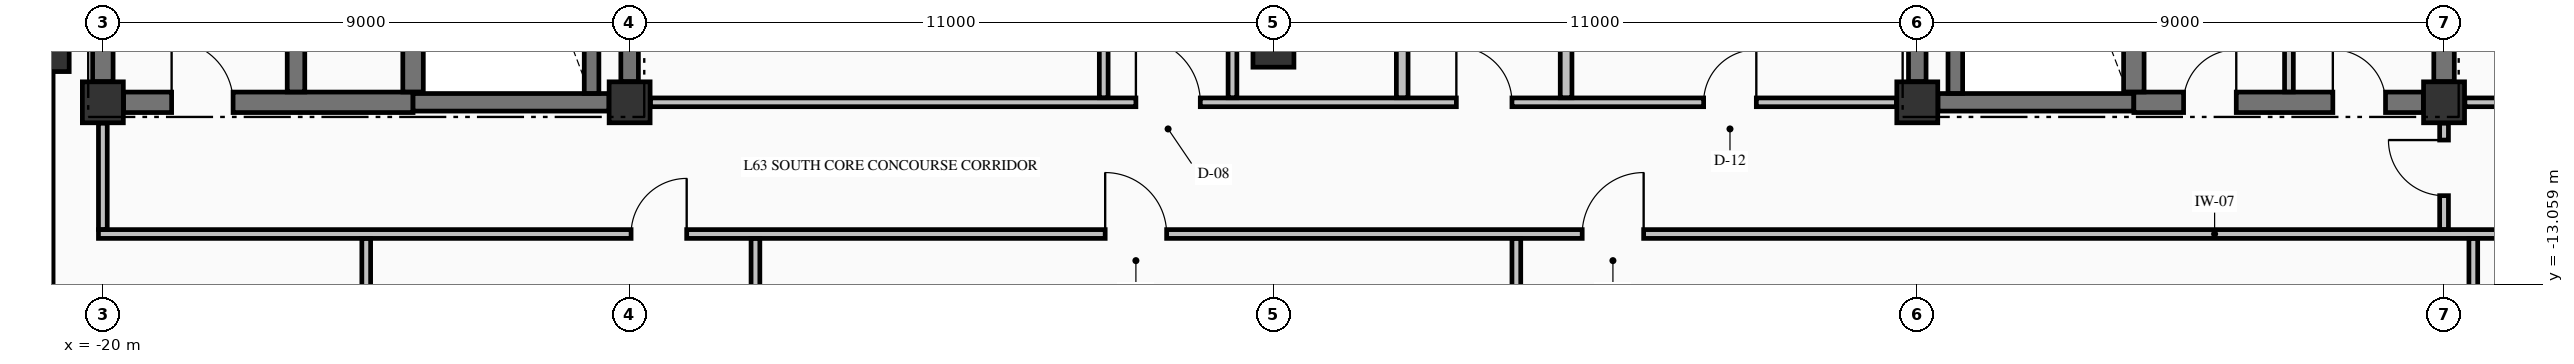
"""IFC4 building model, lengths in metres.
Left out: names, types, materials, properties, quantities, classifications, styles, units other than length and angle.
Written with IfcOpenShell. Run it as: python <this file> out.ifc"""

import sys

from ifc_helpers import new_model, si_unit, direction, frame, frame_2d, origin, origin_2d, place, context, subcontext, project, spatial, rectangle, extrude, element, fill, save


model = new_model("IFC4")
c1 = context("Model", 3, precision=1e-05, world=origin(), true_north=direction((0.0, 1.0)))
c2 = subcontext(c1, "Body", "Model", "MODEL_VIEW")
j1 = project(units=[si_unit("LENGTHUNIT", "METRE"), si_unit("PLANEANGLEUNIT", "RADIAN")], contexts=[c1])
p1 = place(None, origin())
s1 = spatial("IfcSite", under=j1, at=p1, CompositionType="ELEMENT")
p2 = place(p1, origin())
s2 = spatial("IfcBuilding", under=s1, at=p2, CompositionType="ELEMENT")
p3 = place(p2, frame((0.0, 0.0, 239.74)))
s3 = spatial("IfcBuildingStorey", under=s2, at=p3, CompositionType="ELEMENT", Elevation=239.74)
p4 = place(p3, frame((-21.0, -9.0, -0.25), z_axis=(0.0, 0.0, 1.0), x_axis=(1.0, 0.0, 0.0)))
e1 = element("IfcColumn", 1, at=p4, inside=s3, PredefinedType="COLUMN", context=c2, shape_type="SweptSolid", body=[
    extrude(rectangle(XDim=0.85, YDim=0.85, at=origin_2d()), origin(), (0.0, 0.0, 1.0), 3.23),
])
for number, where, z_axis, x_axis in (
    (2, (-20.0, -9.95, -0.25), (0.0, 0.0, 1.0), (1.0, 0.0, 0.0)),
    (3, (-11.0, -9.95, -0.25), (0.0, 0.0, 1.0), (1.0, 0.0, 0.0)),
    (4, (11.0, -9.95, -0.25), (0.0, 0.0, 1.0), (1.0, 0.0, 0.0)),
    (5, (20.0, -9.95, -0.25), (0.0, 0.0, 1.0), (1.0, 0.0, 0.0)),
    (6, (0.0, -9.0, -0.25), (0.0, 0.0, 1.0), (1.0, 0.0, 0.0)),
):
    element("IfcColumn", number, at=place(p3, frame(where, z_axis=z_axis, x_axis=x_axis)), inside=s3, PredefinedType="COLUMN", context=c2, shape_type="SweptSolid", body=[
        extrude(rectangle(XDim=0.7, YDim=0.7, at=origin_2d()), origin(), (0.0, 0.0, 1.0), 3.23),
    ])
p5 = place(p3, frame((-21.0, -9.455, 0.0), z_axis=(0.0, 0.0, 1.0), x_axis=(0.0, -1.0, 0.0)))
e7 = element("IfcWall", 7, at=p5, inside=s3, PredefinedType="STANDARD", context=c2, shape_type="SweptSolid", body=[
    extrude(rectangle(XDim=8.09, YDim=0.3, at=frame_2d((4.045, 0.0))), origin(), (0.0, 0.0, 1.0), 2.372),
])
p6 = place(p3, frame((-19.646, -9.95, 0.0), z_axis=(0.0, 0.0, 1.0), x_axis=(1.0, 0.0, 0.0)))
e8 = element("IfcWall", 8, at=p6, inside=s3, PredefinedType="SHEAR", context=c2, shape_type="SweptSolid", body=[
    extrude(rectangle(XDim=4.946, YDim=0.35, at=frame_2d((2.473, 0.0))), origin(), (0.0, 0.0, 1.0), 2.98),
])
p7 = place(p6, frame((0.821, 0.0, 0.0)))
e9 = element("IfcOpeningElement", 9, at=p7, cuts=e8, PredefinedType="OPENING", context=c2, shape_type="SweptSolid", body=[
    extrude(rectangle(XDim=1.05, YDim=2.15, at=frame_2d((0.525, 1.075))), frame((0.0, 0.185, 0.0), z_axis=(0.0, -1.0, 0.0), x_axis=(1.0, 0.0, 0.0)), (0.0, 0.0, 1.0), 0.37),
])
for number, where, z_axis, x_axis in (
    (10, (-14.7, -9.95, 0.0), (0.0, 0.0, 1.0), (1.0, 0.0, 0.0)),
    (11, (11.354, -9.95, 0.0), (0.0, 0.0, 1.0), (1.0, 0.0, 0.0)),
):
    element("IfcWall", number, at=place(p3, frame(where, z_axis=z_axis, x_axis=x_axis)), inside=s3, PredefinedType="SHEAR", context=c2, shape_type="SweptSolid", body=[
        extrude(rectangle(XDim=3.346, YDim=0.3, at=frame_2d((1.673, 0.0))), origin(), (0.0, 0.0, 1.0), 2.98),
    ])
p8 = place(p3, frame((14.7, -9.95, 0.0), z_axis=(0.0, 0.0, 1.0), x_axis=(1.0, 0.0, 0.0)))
e12 = element("IfcWall", 12, at=p8, inside=s3, PredefinedType="SHEAR", context=c2, shape_type="SweptSolid", body=[
    extrude(rectangle(XDim=4.946, YDim=0.35, at=frame_2d((2.473, 0.0))), origin(), (0.0, 0.0, 1.0), 2.98),
])
p9 = place(p8, frame((0.85, 0.0, 0.0)))
e13 = element("IfcOpeningElement", 13, at=p9, cuts=e12, PredefinedType="OPENING", context=c2, shape_type="SweptSolid", body=[
    extrude(rectangle(XDim=0.9, YDim=2.15, at=frame_2d((0.45, 1.075))), frame((0.0, 0.185, 0.0), z_axis=(0.0, -1.0, 0.0), x_axis=(1.0, 0.0, 0.0)), (0.0, 0.0, 1.0), 0.37),
])
p10 = place(p8, frame((3.4, 0.0, 0.0)))
e14 = element("IfcOpeningElement", 14, at=p10, cuts=e12, PredefinedType="OPENING", context=c2, shape_type="SweptSolid", body=[
    extrude(rectangle(XDim=0.9, YDim=2.15, at=frame_2d((0.45, 1.075))), frame((0.0, 0.185, 0.0), z_axis=(0.0, -1.0, 0.0), x_axis=(1.0, 0.0, 0.0)), (0.0, 0.0, 1.0), 0.37),
])
p11 = place(p3, frame((-20.075, -12.2, 0.0), z_axis=(0.0, 0.0, 1.0), x_axis=(1.0, 0.0, 0.0)))
e15 = element("IfcWall", 15, at=p11, inside=s3, PredefinedType="PARTITIONING", context=c2, shape_type="SweptSolid", body=[
    extrude(rectangle(XDim=45.91, YDim=0.15, at=frame_2d((22.955, 0.0))), origin(), (0.0, 0.0, 1.0), 2.98),
])
p12 = place(p11, frame((9.1, 0.0, 0.0)))
e16 = element("IfcOpeningElement", 16, at=p12, cuts=e15, PredefinedType="OPENING", context=c2, shape_type="SweptSolid", body=[
    extrude(rectangle(XDim=0.95, YDim=2.15, at=frame_2d((0.475, 1.075))), frame((0.0, 0.085, 0.0), z_axis=(0.0, -1.0, 0.0), x_axis=(1.0, 0.0, 0.0)), (0.0, 0.0, 1.0), 0.17),
])
p13 = place(p11, frame((17.2, 0.0, 0.0)))
e17 = element("IfcOpeningElement", 17, at=p13, cuts=e15, PredefinedType="OPENING", context=c2, shape_type="SweptSolid", body=[
    extrude(rectangle(XDim=1.05, YDim=2.15, at=frame_2d((0.525, 1.075))), frame((0.0, 0.085, 0.0), z_axis=(0.0, -1.0, 0.0), x_axis=(1.0, 0.0, 0.0)), (0.0, 0.0, 1.0), 0.17),
])
p14 = place(p11, frame((25.35, 0.0, 0.0)))
e18 = element("IfcOpeningElement", 18, at=p14, cuts=e15, PredefinedType="OPENING", context=c2, shape_type="SweptSolid", body=[
    extrude(rectangle(XDim=1.05, YDim=2.15, at=frame_2d((0.525, 1.075))), frame((0.0, 0.085, 0.0), z_axis=(0.0, -1.0, 0.0), x_axis=(1.0, 0.0, 0.0)), (0.0, 0.0, 1.0), 0.17),
])
p15 = place(p3, frame((-10.644, -9.95, 0.0), z_axis=(0.0, 0.0, 1.0), x_axis=(1.0, 0.0, 0.0)))
e19 = element("IfcWall", 19, at=p15, inside=s3, PredefinedType="PARTITIONING", context=c2, shape_type="SweptSolid", body=[
    extrude(rectangle(XDim=21.288, YDim=0.15, at=frame_2d((10.644, 0.0))), origin(), (0.0, 0.0, 1.0), 2.98),
])
p16 = place(p15, frame((8.294, 0.0, 0.0)))
e20 = element("IfcOpeningElement", 20, at=p16, cuts=e19, PredefinedType="OPENING", context=c2, shape_type="SweptSolid", body=[
    extrude(rectangle(XDim=1.1, YDim=2.15, at=frame_2d((0.55, 1.075))), frame((0.0, 0.085, 0.0), z_axis=(0.0, -1.0, 0.0), x_axis=(1.0, 0.0, 0.0)), (0.0, 0.0, 1.0), 0.17),
])
p17 = place(p15, frame((13.769, 0.0, 0.0)))
e21 = element("IfcOpeningElement", 21, at=p17, cuts=e19, PredefinedType="OPENING", context=c2, shape_type="SweptSolid", body=[
    extrude(rectangle(XDim=0.95, YDim=2.15, at=frame_2d((0.475, 1.075))), frame((0.0, 0.085, 0.0), z_axis=(0.0, -1.0, 0.0), x_axis=(1.0, 0.0, 0.0)), (0.0, 0.0, 1.0), 0.17),
])
p18 = place(p15, frame((17.994, 0.0, 0.0)))
e22 = element("IfcOpeningElement", 22, at=p18, cuts=e19, PredefinedType="OPENING", context=c2, shape_type="SweptSolid", body=[
    extrude(rectangle(XDim=0.9, YDim=2.15, at=frame_2d((0.45, 1.075))), frame((0.0, 0.085, 0.0), z_axis=(0.0, -1.0, 0.0), x_axis=(1.0, 0.0, 0.0)), (0.0, 0.0, 1.0), 0.17),
])
p19 = place(p3, frame((20.356, -9.95, 0.0), z_axis=(0.0, 0.0, 1.0), x_axis=(1.0, 0.0, 0.0)))
e23 = element("IfcWall", 23, at=p19, inside=s3, PredefinedType="PARTITIONING", context=c2, shape_type="SweptSolid", body=[
    extrude(rectangle(XDim=5.479, YDim=0.15, at=frame_2d((2.74, 0.0))), origin(), (0.0, 0.0, 1.0), 2.98),
])
p20 = place(p19, frame((2.169, 0.0, 0.0)))
e24 = element("IfcOpeningElement", 24, at=p20, cuts=e23, PredefinedType="OPENING", context=c2, shape_type="SweptSolid", body=[
    extrude(rectangle(XDim=0.95, YDim=2.15, at=frame_2d((0.475, 1.075))), frame((0.0, 0.085, 0.0), z_axis=(0.0, -1.0, 0.0), x_axis=(1.0, 0.0, 0.0)), (0.0, 0.0, 1.0), 0.17),
])
p21 = place(p3, frame((-20.0, -9.596, 0.0), z_axis=(0.0, 0.0, 1.0), x_axis=(0.0, 1.0, 0.0)))
e25 = element("IfcWall", 25, at=p21, inside=s3, PredefinedType="SHEAR", context=c2, shape_type="SweptSolid", body=[
    extrude(rectangle(XDim=9.194, YDim=0.35, at=frame_2d((4.597, 0.0))), origin(), (0.0, 0.0, 1.0), 2.98),
])
p22 = place(p3, frame((-16.7, -9.773, 0.0), z_axis=(0.0, 0.0, 1.0), x_axis=(0.0, 1.0, 0.0)))
e26 = element("IfcWall", 26, at=p22, inside=s3, PredefinedType="SHEAR", context=c2, shape_type="SweptSolid", body=[
    extrude(rectangle(XDim=9.371, YDim=0.3, at=frame_2d((4.686, 0.0))), origin(), (0.0, 0.0, 1.0), 2.98),
])
p23 = place(p3, frame((-14.7, -9.773, 0.0), z_axis=(0.0, 0.0, 1.0), x_axis=(0.0, 1.0, 0.0)))
e27 = element("IfcWall", 27, at=p23, inside=s3, PredefinedType="SHEAR", context=c2, shape_type="SweptSolid", body=[
    extrude(rectangle(XDim=9.371, YDim=0.35, at=frame_2d((4.686, 0.0))), origin(), (0.0, 0.0, 1.0), 2.98),
])
p24 = place(p3, frame((-11.65, -9.798, 0.0), z_axis=(0.0, 0.0, 1.0), x_axis=(0.0, 1.0, 0.0)))
e28 = element("IfcWall", 28, at=p24, inside=s3, PredefinedType="SOLIDWALL", context=c2, shape_type="SweptSolid", body=[
    extrude(rectangle(XDim=9.396, YDim=0.25, at=frame_2d((4.698, 0.0))), origin(), (0.0, 0.0, 1.0), 2.98),
])
for number, where, z_axis, x_axis in (
    (29, (-11.0, -9.596, 0.0), (0.0, 0.0, 1.0), (0.0, 1.0, 0.0)),
    (30, (11.0, -9.596, 0.0), (0.0, 0.0, 1.0), (0.0, 1.0, 0.0)),
):
    element("IfcWall", number, at=place(p3, frame(where, z_axis=z_axis, x_axis=x_axis)), inside=s3, PredefinedType="SHEAR", context=c2, shape_type="SweptSolid", body=[
        extrude(rectangle(XDim=9.242, YDim=0.3, at=frame_2d((4.621, 0.0))), origin(), (0.0, 0.0, 1.0), 2.98),
    ])
p25 = place(p3, frame((11.65, -9.798, 0.0), z_axis=(0.0, 0.0, 1.0), x_axis=(0.0, 1.0, 0.0)))
e31 = element("IfcWall", 31, at=p25, inside=s3, PredefinedType="SOLIDWALL", context=c2, shape_type="SweptSolid", body=[
    extrude(rectangle(XDim=9.396, YDim=0.25, at=frame_2d((4.698, 0.0))), origin(), (0.0, 0.0, 1.0), 2.98),
])
p26 = place(p3, frame((14.7, -9.773, 0.0), z_axis=(0.0, 0.0, 1.0), x_axis=(0.0, 1.0, 0.0)))
e32 = element("IfcWall", 32, at=p26, inside=s3, PredefinedType="SHEAR", context=c2, shape_type="SweptSolid", body=[
    extrude(rectangle(XDim=9.371, YDim=0.35, at=frame_2d((4.686, 0.0))), origin(), (0.0, 0.0, 1.0), 2.98),
])
p27 = place(p3, frame((20.0, -9.596, 0.0), z_axis=(0.0, 0.0, 1.0), x_axis=(0.0, 1.0, 0.0)))
e33 = element("IfcWall", 33, at=p27, inside=s3, PredefinedType="SHEAR", context=c2, shape_type="SweptSolid", body=[
    extrude(rectangle(XDim=9.242, YDim=0.35, at=frame_2d((4.621, 0.0))), origin(), (0.0, 0.0, 1.0), 2.98),
])
p28 = place(p3, frame((-20.0, -12.122, 0.0), z_axis=(0.0, 0.0, 1.0), x_axis=(0.0, 1.0, 0.0)))
e34 = element("IfcWall", 34, at=p28, inside=s3, PredefinedType="PARTITIONING", context=c2, shape_type="SweptSolid", body=[
    extrude(rectangle(XDim=1.816, YDim=0.15, at=frame_2d((0.908, 0.0))), origin(), (0.0, 0.0, 1.0), 2.57),
])
p29 = place(p3, frame((-15.5, -17.569, 0.0), z_axis=(0.0, 0.0, 1.0), x_axis=(0.0, 1.0, 0.0)))
e35 = element("IfcWall", 35, at=p29, inside=s3, PredefinedType="PARTITIONING", context=c2, shape_type="SweptSolid", body=[
    extrude(rectangle(XDim=5.291, YDim=0.15, at=frame_2d((2.646, 0.0))), origin(), (0.0, 0.0, 1.0), 2.98),
])
p30 = place(p3, frame((-8.85, -23.335, 0.0), z_axis=(0.0, 0.0, 1.0), x_axis=(0.0, 1.0, 0.0)))
e36 = element("IfcWall", 36, at=p30, inside=s3, PredefinedType="PARTITIONING", context=c2, shape_type="SweptSolid", body=[
    extrude(rectangle(XDim=11.057, YDim=0.15, at=frame_2d((5.528, 0.0))), origin(), (0.0, 0.0, 1.0), 2.98),
])
p31 = place(p3, frame((-2.9, -9.872, 0.0), z_axis=(0.0, 0.0, 1.0), x_axis=(0.0, 1.0, 0.0)))
e37 = element("IfcWall", 37, at=p31, inside=s3, PredefinedType="PARTITIONING", context=c2, shape_type="SweptSolid", body=[
    extrude(rectangle(XDim=9.544, YDim=0.15, at=frame_2d((4.772, 0.0))), origin(), (0.0, 0.0, 1.0), 2.98),
])
p32 = place(p3, frame((-0.7, -9.872, 0.0), z_axis=(0.0, 0.0, 1.0), x_axis=(0.0, 1.0, 0.0)))
e38 = element("IfcWall", 38, at=p32, inside=s3, PredefinedType="PARTITIONING", context=c2, shape_type="SweptSolid", body=[
    extrude(rectangle(XDim=5.519, YDim=0.15, at=frame_2d((2.76, 0.0))), origin(), (0.0, 0.0, 1.0), 2.98),
])
p33 = place(p32, frame((2.597, 0.0, 0.0)))
e39 = element("IfcOpeningElement", 39, at=p33, cuts=e38, PredefinedType="OPENING", context=c2, shape_type="SweptSolid", body=[
    extrude(rectangle(XDim=0.95, YDim=2.15, at=frame_2d((0.475, 1.075))), frame((0.0, 0.085, 0.0), z_axis=(0.0, -1.0, 0.0), x_axis=(1.0, 0.0, 0.0)), (0.0, 0.0, 1.0), 0.17),
])
p34 = place(p3, frame((2.2, -9.872, 0.0), z_axis=(0.0, 0.0, 1.0), x_axis=(0.0, 1.0, 0.0)))
e40 = element("IfcWall", 40, at=p34, inside=s3, PredefinedType="PARTITIONING", context=c2, shape_type="SweptSolid", body=[
    extrude(rectangle(XDim=5.519, YDim=0.2, at=frame_2d((2.76, 0.0))), origin(), (0.0, 0.0, 1.0), 2.98),
])
p35 = place(p3, frame((4.15, -23.335, 0.0), z_axis=(0.0, 0.0, 1.0), x_axis=(0.0, 1.0, 0.0)))
e41 = element("IfcWall", 41, at=p35, inside=s3, PredefinedType="PARTITIONING", context=c2, shape_type="SweptSolid", body=[
    extrude(rectangle(XDim=11.057, YDim=0.15, at=frame_2d((5.528, 0.0))), origin(), (0.0, 0.0, 1.0), 2.98),
])
p36 = place(p3, frame((5.0, -9.872, 0.0), z_axis=(0.0, 0.0, 1.0), x_axis=(0.0, 1.0, 0.0)))
e42 = element("IfcWall", 42, at=p36, inside=s3, PredefinedType="PARTITIONING", context=c2, shape_type="SweptSolid", body=[
    extrude(rectangle(XDim=5.519, YDim=0.2, at=frame_2d((2.76, 0.0))), origin(), (0.0, 0.0, 1.0), 2.98),
])
p37 = place(p3, frame((17.35, -9.772, 0.0), z_axis=(0.0, 0.0, 1.0), x_axis=(0.0, 1.0, 0.0)))
e43 = element("IfcWall", 43, at=p37, inside=s3, PredefinedType="PARTITIONING", context=c2, shape_type="SweptSolid", body=[
    extrude(rectangle(XDim=14.494, YDim=0.15, at=frame_2d((7.247, 0.0))), origin(), (0.0, 0.0, 1.0), 2.98),
])
p38 = place(p3, frame((20.0, -12.122, 0.0), z_axis=(0.0, 0.0, 1.0), x_axis=(0.0, 1.0, 0.0)))
e44 = element("IfcWall", 44, at=p38, inside=s3, PredefinedType="PARTITIONING", context=c2, shape_type="SweptSolid", body=[
    extrude(rectangle(XDim=1.816, YDim=0.15, at=frame_2d((0.908, 0.0))), origin(), (0.0, 0.0, 1.0), 2.98),
])
p39 = place(p38, frame((0.577, 0.0, 0.0)))
e45 = element("IfcOpeningElement", 45, at=p39, cuts=e44, PredefinedType="OPENING", context=c2, shape_type="SweptSolid", body=[
    extrude(rectangle(XDim=0.95, YDim=2.15, at=frame_2d((0.475, 1.075))), frame((0.0, 0.085, 0.0), z_axis=(0.0, -1.0, 0.0), x_axis=(1.0, 0.0, 0.0)), (0.0, 0.0, 1.0), 0.17),
])
p40 = place(p3, frame((20.5, -17.569, 0.0), z_axis=(0.0, 0.0, 1.0), x_axis=(0.0, 1.0, 0.0)))
e46 = element("IfcWall", 46, at=p40, inside=s3, PredefinedType="PARTITIONING", context=c2, shape_type="SweptSolid", body=[
    extrude(rectangle(XDim=5.291, YDim=0.15, at=frame_2d((2.646, 0.0))), origin(), (0.0, 0.0, 1.0), 2.98),
])
p41 = place(p7, origin())
e47 = element("IfcDoor", 47, at=p41, inside=s3, OperationType="SINGLE_SWING_LEFT", PredefinedType="DOOR", context=c2, shape_type="SweptSolid", body=[
    extrude(rectangle(XDim=1.05, YDim=2.15, at=frame_2d((0.525, 1.075))), frame((0.0, 0.025, 0.0), z_axis=(0.0, -1.0, 0.0), x_axis=(1.0, 0.0, 0.0)), (0.0, 0.0, 1.0), 0.05),
])
fill(e9, e47)
p42 = place(p9, origin())
e48 = element("IfcDoor", 48, at=p42, inside=s3, OperationType="SINGLE_SWING_RIGHT", PredefinedType="DOOR", context=c2, shape_type="SweptSolid", body=[
    extrude(rectangle(XDim=0.9, YDim=2.15, at=frame_2d((0.45, 1.075))), frame((0.0, 0.025, 0.0), z_axis=(0.0, -1.0, 0.0), x_axis=(1.0, 0.0, 0.0)), (0.0, 0.0, 1.0), 0.05),
])
fill(e13, e48)
p43 = place(p10, origin())
e49 = element("IfcDoor", 49, at=p43, inside=s3, OperationType="SINGLE_SWING_LEFT", PredefinedType="DOOR", context=c2, shape_type="SweptSolid", body=[
    extrude(rectangle(XDim=0.9, YDim=2.15, at=frame_2d((0.45, 1.075))), frame((0.0, 0.025, 0.0), z_axis=(0.0, -1.0, 0.0), x_axis=(1.0, 0.0, 0.0)), (0.0, 0.0, 1.0), 0.05),
])
fill(e14, e49)
p44 = place(p16, origin())
e50 = element("IfcDoor", 50, at=p44, inside=s3, OperationType="SINGLE_SWING_LEFT", PredefinedType="DOOR", context=c2, shape_type="SweptSolid", body=[
    extrude(rectangle(XDim=1.1, YDim=2.15, at=frame_2d((0.55, 1.075))), frame((0.0, 0.025, 0.0), z_axis=(0.0, -1.0, 0.0), x_axis=(1.0, 0.0, 0.0)), (0.0, 0.0, 1.0), 0.05),
])
fill(e20, e50)
p45 = place(p12, origin())
e51 = element("IfcDoor", 51, at=p45, inside=s3, OperationType="SINGLE_SWING_RIGHT", PredefinedType="DOOR", context=c2, shape_type="SweptSolid", body=[
    extrude(rectangle(XDim=0.95, YDim=2.15, at=frame_2d((0.475, 1.075))), frame((0.0, 0.025, 0.0), z_axis=(0.0, -1.0, 0.0), x_axis=(1.0, 0.0, 0.0)), (0.0, 0.0, 1.0), 0.05),
])
fill(e16, e51)
p46 = place(p13, origin())
e52 = element("IfcDoor", 52, at=p46, inside=s3, OperationType="SINGLE_SWING_LEFT", PredefinedType="DOOR", context=c2, shape_type="SweptSolid", body=[
    extrude(rectangle(XDim=1.05, YDim=2.15, at=frame_2d((0.525, 1.075))), frame((0.0, 0.025, 0.0), z_axis=(0.0, -1.0, 0.0), x_axis=(1.0, 0.0, 0.0)), (0.0, 0.0, 1.0), 0.05),
])
fill(e17, e52)
p47 = place(p14, origin())
e53 = element("IfcDoor", 53, at=p47, inside=s3, OperationType="SINGLE_SWING_RIGHT", PredefinedType="DOOR", context=c2, shape_type="SweptSolid", body=[
    extrude(rectangle(XDim=1.05, YDim=2.15, at=frame_2d((0.525, 1.075))), frame((0.0, 0.025, 0.0), z_axis=(0.0, -1.0, 0.0), x_axis=(1.0, 0.0, 0.0)), (0.0, 0.0, 1.0), 0.05),
])
fill(e18, e53)
p48 = place(p17, origin())
e54 = element("IfcDoor", 54, at=p48, inside=s3, OperationType="SINGLE_SWING_LEFT", PredefinedType="DOOR", context=c2, shape_type="SweptSolid", body=[
    extrude(rectangle(XDim=0.95, YDim=2.15, at=frame_2d((0.475, 1.075))), frame((0.0, 0.025, 0.0), z_axis=(0.0, -1.0, 0.0), x_axis=(1.0, 0.0, 0.0)), (0.0, 0.0, 1.0), 0.05),
])
fill(e21, e54)
p49 = place(p18, origin())
e55 = element("IfcDoor", 55, at=p49, inside=s3, OperationType="SINGLE_SWING_RIGHT", PredefinedType="DOOR", context=c2, shape_type="SweptSolid", body=[
    extrude(rectangle(XDim=0.9, YDim=2.15, at=frame_2d((0.45, 1.075))), frame((0.0, 0.025, 0.0), z_axis=(0.0, -1.0, 0.0), x_axis=(1.0, 0.0, 0.0)), (0.0, 0.0, 1.0), 0.05),
])
fill(e22, e55)
p50 = place(p39, origin())
e56 = element("IfcDoor", 56, at=p50, inside=s3, OperationType="SINGLE_SWING_RIGHT", PredefinedType="DOOR", context=c2, shape_type="SweptSolid", body=[
    extrude(rectangle(XDim=0.95, YDim=2.15, at=frame_2d((0.475, 1.075))), frame((0.0, 0.025, 0.0), z_axis=(0.0, -1.0, 0.0), x_axis=(1.0, 0.0, 0.0)), (0.0, 0.0, 1.0), 0.05),
])
fill(e45, e56)
save(model, sys.argv[1])
